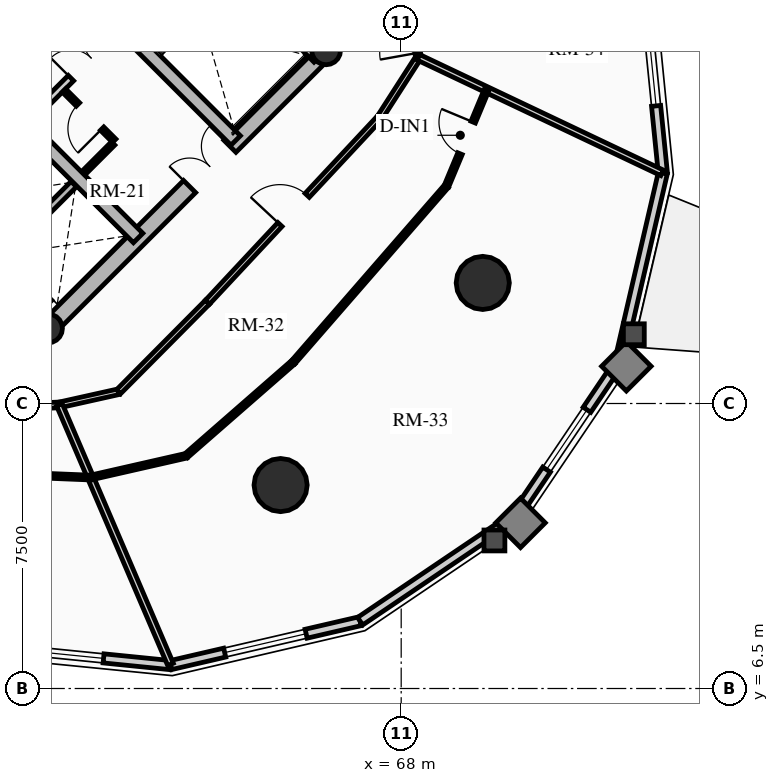
"""IFC4 building model, lengths in metres.
Left out: names, types, materials, properties, quantities, classifications, styles, units other than length and angle.
Written with IfcOpenShell. Run it as: python <this file> out.ifc"""

import sys

from ifc_helpers import new_model, si_unit, direction, frame, frame_2d, origin, origin_2d, place, context, subcontext, project, spatial, rectangle, circle, hollow_circle, extrude, source, transform, mapped, element, fill, save


model = new_model("IFC4")
c1 = context("Model", 3, precision=1e-05, world=origin(), true_north=direction((0.0, 1.0)))
c2 = subcontext(c1, "Body", "Model", "MODEL_VIEW")
j1 = project(units=[si_unit("LENGTHUNIT", "METRE"), si_unit("PLANEANGLEUNIT", "RADIAN")], contexts=[c1])
p1 = place(None, origin())
s1 = spatial("IfcSite", under=j1, at=p1, CompositionType="ELEMENT")
p2 = place(p1, origin())
s2 = spatial("IfcBuilding", under=s1, at=p2, CompositionType="ELEMENT")
p3 = place(p2, frame((0.0, 0.0, 110.89)))
s3 = spatial("IfcBuildingStorey", under=s2, at=p3, CompositionType="ELEMENT", Elevation=110.89)
for number, where, z_axis, x_axis in (
    (1, (58.737, 15.697, 0.0), (0.0, 0.0, 1.0), (-0.707, 0.707, 0.0)),
    (2, (66.303, 23.263, 0.0), (0.0, 0.0, 1.0), (-0.707, 0.707, 0.0)),
):
    element("IfcWall", number, at=place(p3, frame(where, z_axis=z_axis, x_axis=x_axis)), inside=s3, PredefinedType="SHEAR", context=c2, shape_type="SweptSolid", body=[
        extrude(rectangle(XDim=14.2, YDim=0.45, at=frame_2d((7.1, 0.0))), origin(), (0.0, 0.0, 1.0), 2.91),
    ])
p4 = place(p3, frame((58.578, 15.856, 0.0), z_axis=(0.0, 0.0, 1.0), x_axis=(0.707106781187, 0.707106781187, 0.0)))
e3 = element("IfcWall", 3, at=p4, inside=s3, PredefinedType="SHEAR", context=c2, shape_type="SweptSolid", body=[
    extrude(rectangle(XDim=10.7, YDim=0.45, at=frame_2d((5.35, 0.0))), origin(), (0.0, 0.0, 1.0), 2.91),
])
m1 = source(origin(), c2, "Body", "SweptSolid", [
    extrude(rectangle(XDim=1.5, YDim=2.02, at=frame_2d((0.75, 1.01))), frame((0.0, 0.235, 0.0), z_axis=(0.0, -1.0, 0.0), x_axis=(1.0, 0.0, 0.0)), (0.0, 0.0, 1.0), 0.47),
])
p5 = place(p4, frame((5.45, 0.0, 0.0)))
e4 = element("IfcOpeningElement", 4, at=p5, cuts=e3, PredefinedType="OPENING", context=c2, shape_type="MappedRepresentation", body=[
    mapped(m1, transform((0.0, 0.0, 0.0), x_axis=(1.0, 0.0, 0.0), y_axis=(0.0, 1.0, 0.0), z_axis=(0.0, 0.0, 1.0), scale=1.0)),
])
p6 = place(p3, frame((61.078, 18.355, 0.0), z_axis=(0.0, 0.0, 1.0), x_axis=(-0.707106781187, 0.707106781187, 0.0)))
e5 = element("IfcWall", 5, at=p6, inside=s3, PredefinedType="SHEAR", context=c2, shape_type="SweptSolid", body=[
    extrude(rectangle(XDim=13.75, YDim=0.35, at=frame_2d((6.875, 0.0))), origin(), (0.0, 0.0, 1.0), 2.91),
])
m2 = source(origin(), c2, "Body", "SweptSolid", [
    extrude(rectangle(XDim=1.1, YDim=2.015, at=frame_2d((0.55, 1.007))), frame((0.0, 0.185, 0.0), z_axis=(0.0, -1.0, 0.0), x_axis=(1.0, 0.0, 0.0)), (0.0, 0.0, 1.0), 0.37),
])
p7 = place(p6, frame((4.875, 0.0, 0.0)))
e6 = element("IfcOpeningElement", 6, at=p7, cuts=e5, PredefinedType="OPENING", context=c2, shape_type="MappedRepresentation", body=[
    mapped(m2, transform((0.0, 0.0, 0.0), x_axis=(1.0, 0.0, 0.0), y_axis=(0.0, 1.0, 0.0), z_axis=(0.0, 0.0, 1.0), scale=1.0)),
])
m3 = source(origin(), c2, "Body", "SweptSolid", [
    extrude(rectangle(XDim=1.15, YDim=2.02, at=frame_2d((0.575, 1.01))), frame((0.0, 0.185, 0.0), z_axis=(0.0, -1.0, 0.0), x_axis=(1.0, 0.0, 0.0)), (0.0, 0.0, 1.0), 0.37),
])
p8 = place(p6, frame((7.295, 0.0, 0.0)))
e7 = element("IfcOpeningElement", 7, at=p8, cuts=e5, PredefinedType="OPENING", context=c2, shape_type="MappedRepresentation", body=[
    mapped(m3, transform((0.0, 0.0, 0.0), x_axis=(1.0, 0.0, 0.0), y_axis=(0.0, 1.0, 0.0), z_axis=(0.0, 0.0, 1.0), scale=1.0)),
])
p9 = place(p3, frame((63.645, 20.922, 0.0), z_axis=(0.0, 0.0, 1.0), x_axis=(-0.707106781187, 0.707106781187, 0.0)))
e8 = element("IfcWall", 8, at=p9, inside=s3, PredefinedType="SHEAR", context=c2, shape_type="SweptSolid", body=[
    extrude(rectangle(XDim=13.75, YDim=0.35, at=frame_2d((6.875, 0.0))), origin(), (0.0, 0.0, 1.0), 2.91),
])
p10 = place(p9, frame((10.0, 0.0, 0.0)))
e9 = element("IfcOpeningElement", 9, at=p10, cuts=e8, PredefinedType="OPENING", context=c2, shape_type="MappedRepresentation", body=[
    mapped(m2, transform((0.0, 0.0, 0.0), x_axis=(1.0, 0.0, 0.0), y_axis=(0.0, 1.0, 0.0), z_axis=(0.0, 0.0, 1.0), scale=1.0)),
])
p11 = place(p9, frame((12.0, 0.0, 0.0)))
e10 = element("IfcOpeningElement", 10, at=p11, cuts=e8, PredefinedType="OPENING", context=c2, shape_type="MappedRepresentation", body=[
    mapped(m2, transform((0.0, 0.0, 0.0), x_axis=(1.0, 0.0, 0.0), y_axis=(0.0, 1.0, 0.0), z_axis=(0.0, 0.0, 1.0), scale=1.0)),
])
p12 = place(p9, frame((5.305, 0.0, 0.0)))
e11 = element("IfcOpeningElement", 11, at=p12, cuts=e8, PredefinedType="OPENING", context=c2, shape_type="MappedRepresentation", body=[
    mapped(m3, transform((0.0, 0.0, 0.0), x_axis=(1.0, 0.0, 0.0), y_axis=(0.0, 1.0, 0.0), z_axis=(0.0, 0.0, 1.0), scale=1.0)),
])
p13 = place(p3, frame((65.83, 23.107, 0.0), z_axis=(0.0, 0.0, 1.0), x_axis=(-0.707088616009, 0.707124945897, 0.0)))
e12 = element("IfcWall", 12, at=p13, inside=s3, PredefinedType="SHEAR", context=c2, shape_type="SweptSolid", body=[
    extrude(rectangle(XDim=6.72, YDim=0.35, at=frame_2d((3.36, 0.0))), origin(), (0.0, 0.0, 1.0), 2.91),
])
for number, where, z_axis, x_axis in (
    (13, (58.706, 15.976, 0.0), (0.0, 0.0, 1.0), (0.707, 0.707, 0.0)),
    (14, (66.024, 23.294, 0.0), (0.0, 0.0, 1.0), (0.707, 0.707, 0.0)),
):
    element("IfcColumn", number, at=place(p3, frame(where, z_axis=z_axis, x_axis=x_axis)), inside=s3, PredefinedType="COLUMN", context=c2, shape_type="SweptSolid", body=[
        extrude(hollow_circle(Radius=0.38, WallThickness=0.032, at=origin_2d()), origin(), (0.0, 0.0, 1.0), 2.91),
    ])
for number, where, z_axis, x_axis in (
    (15, (64.827, 11.854, 0.0), (0.0, 0.0, 1.0), (1.0, 0.0, 0.0)),
    (16, (70.146, 17.173, 0.0), (0.0, 0.0, 1.0), (1.0, 0.0, 0.0)),
):
    element("IfcColumn", number, at=place(p3, frame(where, z_axis=z_axis, x_axis=x_axis)), inside=s3, PredefinedType="USERDEFINED", context=c2, shape_type="SweptSolid", body=[
        extrude(circle(Radius=0.7, at=origin_2d()), origin(), (0.0, 0.0, 1.0), 2.91),
    ])
p14 = place(p3, frame((61.933, 7.115, 0.0), z_axis=(0.0, 0.0, 1.0), x_axis=(-0.994971754311, 0.10015591906, 0.0)))
e17 = element("IfcWall", 17, at=p14, inside=s3, PredefinedType="SOLIDWALL", context=c2, shape_type="SweptSolid", body=[
    extrude(rectangle(XDim=5.448, YDim=0.24, at=frame_2d((2.724, 0.0))), origin(), (0.0, 0.0, 1.0), 2.179),
])
m4 = source(origin(), c2, "Body", "SweptSolid", [
    extrude(rectangle(XDim=1.9, YDim=1.35, at=frame_2d((0.95, 0.675))), frame((0.0, 0.13, 0.0), z_axis=(0.0, -1.0, 0.0), x_axis=(1.0, 0.0, 0.0)), (0.0, 0.0, 1.0), 0.26),
])
p15 = place(p14, frame((1.774, 0.0, 0.65)))
e18 = element("IfcOpeningElement", 18, at=p15, cuts=e17, PredefinedType="OPENING", context=c2, shape_type="MappedRepresentation", body=[
    mapped(m4, transform((0.0, 0.0, 0.0), x_axis=(1.0, 0.0, 0.0), y_axis=(0.0, 1.0, 0.0), z_axis=(0.0, 0.0, 1.0), scale=1.0)),
])
p16 = place(p3, frame((66.92, 8.271, 0.0), z_axis=(0.0, 0.0, 1.0), x_axis=(-0.974165631126, -0.225834725257, 0.0)))
e19 = element("IfcWall", 19, at=p16, inside=s3, PredefinedType="SOLIDWALL", context=c2, shape_type="SweptSolid", body=[
    extrude(rectangle(XDim=5.119, YDim=0.24, at=frame_2d((2.56, 0.0))), origin(), (0.0, 0.0, 1.0), 2.179),
])
m5 = source(origin(), c2, "Body", "SweptSolid", [
    extrude(rectangle(XDim=2.2, YDim=1.35, at=frame_2d((1.1, 0.675))), frame((0.0, 0.13, 0.0), z_axis=(0.0, -1.0, 0.0), x_axis=(1.0, 0.0, 0.0)), (0.0, 0.0, 1.0), 0.26),
])
p17 = place(p16, frame((1.459, 0.0, 0.65)))
e20 = element("IfcOpeningElement", 20, at=p17, cuts=e19, PredefinedType="OPENING", context=c2, shape_type="MappedRepresentation", body=[
    mapped(m5, transform((0.0, 0.0, 0.0), x_axis=(1.0, 0.0, 0.0), y_axis=(0.0, 1.0, 0.0), z_axis=(0.0, 0.0, 1.0), scale=1.0)),
])
p18 = place(p3, frame((70.985, 11.015, 0.0), z_axis=(0.0, 0.0, 1.0), x_axis=(-0.828781148131, -0.559572880421, 0.0)))
e21 = element("IfcWall", 21, at=p18, inside=s3, PredefinedType="SOLIDWALL", context=c2, shape_type="SweptSolid", body=[
    extrude(rectangle(XDim=4.905, YDim=0.24, at=frame_2d((2.452, 0.0))), origin(), (0.0, 0.0, 1.0), 2.179),
])
p19 = place(p3, frame((73.729, 15.08, 0.0), z_axis=(0.0, 0.0, 1.0), x_axis=(-0.559572880421, -0.828781148131, 0.0)))
e22 = element("IfcWall", 22, at=p19, inside=s3, PredefinedType="SOLIDWALL", context=c2, shape_type="SweptSolid", body=[
    extrude(rectangle(XDim=4.905, YDim=0.24, at=frame_2d((2.452, 0.0))), origin(), (0.0, 0.0, 1.0), 2.179),
])
p20 = place(p19, frame((1.502, 0.0, 0.65)))
e23 = element("IfcOpeningElement", 23, at=p20, cuts=e22, PredefinedType="OPENING", context=c2, shape_type="MappedRepresentation", body=[
    mapped(m4, transform((0.0, 0.0, 0.0), x_axis=(1.0, 0.0, 0.0), y_axis=(0.0, 1.0, 0.0), z_axis=(0.0, 0.0, 1.0), scale=1.0)),
])
p21 = place(p3, frame((74.885, 20.067, 0.0), z_axis=(0.0, 0.0, 1.0), x_axis=(-0.225834725257, -0.974165631126, 0.0)))
e24 = element("IfcWall", 24, at=p21, inside=s3, PredefinedType="SOLIDWALL", context=c2, shape_type="SweptSolid", body=[
    extrude(rectangle(XDim=5.119, YDim=0.24, at=frame_2d((2.56, 0.0))), origin(), (0.0, 0.0, 1.0), 2.179),
])
p22 = place(p3, frame((74.339, 25.487, 0.0), z_axis=(0.0, 0.0, 1.0), x_axis=(0.10015591906, -0.994971754311, 0.0)))
e25 = element("IfcWall", 25, at=p22, inside=s3, PredefinedType="SOLIDWALL", context=c2, shape_type="SweptSolid", body=[
    extrude(rectangle(XDim=5.448, YDim=0.24, at=frame_2d((2.724, 0.0))), origin(), (0.0, 0.0, 1.0), 2.179),
])
p23 = place(p22, frame((1.774, 0.0, 0.65)))
e26 = element("IfcOpeningElement", 26, at=p23, cuts=e25, PredefinedType="OPENING", context=c2, shape_type="MappedRepresentation", body=[
    mapped(m4, transform((0.0, 0.0, 0.0), x_axis=(1.0, 0.0, 0.0), y_axis=(0.0, 1.0, 0.0), z_axis=(0.0, 0.0, 1.0), scale=1.0)),
])
p24 = place(p3, frame((57.284, 17.673, 0.0), z_axis=(0.0, 0.0, 1.0), x_axis=(0.707147878904, 0.70706568108, 0.0)))
e27 = element("IfcWall", 27, at=p24, inside=s3, PredefinedType="SHEAR", context=c2, shape_type="SweptSolid", body=[
    extrude(rectangle(XDim=2.97, YDim=0.2, at=frame_2d((1.485, 0.0))), origin(), (0.0, 0.0, 1.0), 2.91),
])
p25 = place(p3, frame((58.214, 21.467, 0.0), z_axis=(0.0, 0.0, 1.0), x_axis=(0.707106781187, 0.707106781187, 0.0)))
e28 = element("IfcWall", 28, at=p25, inside=s3, PredefinedType="PARTITIONING", context=c2, shape_type="SweptSolid", body=[
    extrude(rectangle(XDim=3.28, YDim=0.2, at=frame_2d((1.64, 0.0))), origin(), (0.0, 0.0, 1.0), 2.655),
])
m6 = source(origin(), c2, "Body", "SweptSolid", [
    extrude(rectangle(XDim=1.5, YDim=2.02, at=frame_2d((0.75, 1.01))), frame((0.0, 0.11, 0.0), z_axis=(0.0, -1.0, 0.0), x_axis=(1.0, 0.0, 0.0)), (0.0, 0.0, 1.0), 0.22),
])
p26 = place(p25, frame((1.55, 0.0, 0.0)))
e29 = element("IfcOpeningElement", 29, at=p26, cuts=e28, PredefinedType="OPENING", context=c2, shape_type="MappedRepresentation", body=[
    mapped(m6, transform((0.0, 0.0, 0.0), x_axis=(1.0, 0.0, 0.0), y_axis=(0.0, 1.0, 0.0), z_axis=(0.0, 0.0, 1.0), scale=1.0)),
])
p27 = place(p3, frame((60.448, 20.915, 0.0), z_axis=(0.0, 0.0, 1.0), x_axis=(-0.707106781187, 0.707106781187, 0.0)))
e30 = element("IfcWall", 30, at=p27, inside=s3, PredefinedType="PARTITIONING", context=c2, shape_type="SweptSolid", body=[
    extrude(rectangle(XDim=1.87, YDim=0.125, at=frame_2d((0.935, 0.0))), origin(), (0.0, 0.0, 1.0), 2.655),
])
m7 = source(origin(), c2, "Body", "SweptSolid", [
    extrude(rectangle(XDim=0.9, YDim=2.005, at=frame_2d((0.45, 1.002))), frame((0.0, 0.073, 0.0), z_axis=(0.0, -1.0, 0.0), x_axis=(1.0, 0.0, 0.0)), (0.0, 0.0, 1.0), 0.145),
])
p28 = place(p27, frame((0.45, 0.0, 0.0)))
e31 = element("IfcOpeningElement", 31, at=p28, cuts=e30, PredefinedType="OPENING", context=c2, shape_type="MappedRepresentation", body=[
    mapped(m7, transform((0.0, 0.0, 0.0), x_axis=(1.0, 0.0, 0.0), y_axis=(0.0, 1.0, 0.0), z_axis=(0.0, 0.0, 1.0), scale=1.0)),
])
p29 = place(p3, frame((59.643, 20.066, 0.0), z_axis=(0.0, 0.0, 1.0), x_axis=(0.707106781187, 0.707106781187, 0.0)))
e32 = element("IfcWall", 32, at=p29, inside=s3, PredefinedType="PARTITIONING", context=c2, shape_type="SweptSolid", body=[
    extrude(rectangle(XDim=1.1, YDim=0.125, at=frame_2d((0.55, 0.0))), origin(), (0.0, 0.0, 1.0), 2.655),
])
p30 = place(p3, frame((57.511, 13.897, 0.0), z_axis=(0.0, 0.0, 1.0), x_axis=(0.999024538494, 0.044158481476, 0.0)))
e33 = element("IfcWall", 33, at=p30, inside=s3, PredefinedType="PARTITIONING", context=c2, shape_type="SweptSolid", body=[
    extrude(rectangle(XDim=1.498, YDim=0.15, at=frame_2d((0.749, 0.0))), origin(), (0.0, 0.0, 1.0), 2.225),
])
p31 = place(p3, frame((59.008, 13.963, 0.0), z_axis=(0.0, 0.0, 1.0), x_axis=(0.976020856791, 0.21767702476, 0.0)))
e34 = element("IfcWall", 34, at=p31, inside=s3, PredefinedType="PARTITIONING", context=c2, shape_type="SweptSolid", body=[
    extrude(rectangle(XDim=1.593, YDim=0.15, at=frame_2d((0.796, 0.0))), origin(), (0.0, 0.0, 1.0), 2.225),
])
p32 = place(p3, frame((60.562, 14.31, 0.0), z_axis=(0.0, 0.0, 1.0), x_axis=(0.704566236161, 0.709638230975, 0.0)))
e35 = element("IfcWall", 35, at=p32, inside=s3, PredefinedType="PARTITIONING", context=c2, shape_type="SweptSolid", body=[
    extrude(rectangle(XDim=3.321, YDim=0.15, at=frame_2d((1.661, 0.0))), origin(), (0.0, 0.0, 1.0), 2.225),
])
p33 = place(p3, frame((62.903, 16.667, 0.0), z_axis=(0.0, 0.0, 1.0), x_axis=(0.682371947497, 0.731005147225, 0.0)))
e36 = element("IfcWall", 36, at=p33, inside=s3, PredefinedType="PARTITIONING", context=c2, shape_type="SweptSolid", body=[
    extrude(rectangle(XDim=6.642, YDim=0.15, at=frame_2d((3.321, 0.0))), origin(), (0.0, 0.0, 1.0), 2.225),
])
m8 = source(origin(), c2, "Body", "SweptSolid", [
    extrude(rectangle(XDim=1.05, YDim=2.015, at=frame_2d((0.525, 1.007))), frame((0.0, 0.085, 0.0), z_axis=(0.0, -1.0, 0.0), x_axis=(1.0, 0.0, 0.0)), (0.0, 0.0, 1.0), 0.17),
])
p34 = place(p33, frame((2.796, 0.0, 0.0)))
e37 = element("IfcOpeningElement", 37, at=p34, cuts=e36, PredefinedType="OPENING", context=c2, shape_type="MappedRepresentation", body=[
    mapped(m8, transform((0.0, 0.0, 0.0), x_axis=(1.0, 0.0, 0.0), y_axis=(0.0, 1.0, 0.0), z_axis=(0.0, 0.0, 1.0), scale=1.0)),
])
p35 = place(p3, frame((67.435, 21.521, 0.0), z_axis=(0.0, 0.0, 1.0), x_axis=(0.540777197838, 0.841165870859, 0.0)))
e38 = element("IfcWall", 38, at=p35, inside=s3, PredefinedType="PARTITIONING", context=c2, shape_type="SweptSolid", body=[
    extrude(rectangle(XDim=1.888, YDim=0.15, at=frame_2d((0.944, 0.0))), origin(), (0.0, 0.0, 1.0), 2.225),
])
p36 = place(p3, frame((68.456, 23.11, 0.0), z_axis=(0.0, 0.0, 1.0), x_axis=(-0.1772522795, 0.984165448191, 0.0)))
e39 = element("IfcWall", 39, at=p36, inside=s3, PredefinedType="PARTITIONING", context=c2, shape_type="SweptSolid", body=[
    extrude(rectangle(XDim=1.382, YDim=0.15, at=frame_2d((0.691, 0.0))), origin(), (0.0, 0.0, 1.0), 2.225),
])
m9 = source(origin(), c2, "Body", "SweptSolid", [
    extrude(rectangle(XDim=1.0, YDim=2.015, at=frame_2d((0.5, 1.007))), frame((0.0, 0.085, 0.0), z_axis=(0.0, -1.0, 0.0), x_axis=(1.0, 0.0, 0.0)), (0.0, 0.0, 1.0), 0.17),
])
p37 = place(p36, frame((0.12, 0.0, 0.0)))
e40 = element("IfcOpeningElement", 40, at=p37, cuts=e39, PredefinedType="OPENING", context=c2, shape_type="MappedRepresentation", body=[
    mapped(m9, transform((0.0, 0.0, 0.0), x_axis=(1.0, 0.0, 0.0), y_axis=(0.0, 1.0, 0.0), z_axis=(0.0, 0.0, 1.0), scale=1.0)),
])
p38 = place(p3, frame((59.008, 13.963, 0.0), z_axis=(0.0, 0.0, 1.0), x_axis=(0.393439207333, -0.919350635032, 0.0)))
e41 = element("IfcWall", 41, at=p38, inside=s3, PredefinedType="PARTITIONING", context=c2, shape_type="SweptSolid", body=[
    extrude(rectangle(XDim=7.427, YDim=0.16, at=frame_2d((3.713, 0.0))), origin(), (0.0, 0.0, 1.0), 2.179),
])
p39 = place(p3, frame((68.456, 23.11, 0.0), z_axis=(0.0, 0.0, 1.0), x_axis=(0.903539425667, -0.428504966442, 0.0)))
e42 = element("IfcWall", 42, at=p39, inside=s3, PredefinedType="PARTITIONING", context=c2, shape_type="SweptSolid", body=[
    extrude(rectangle(XDim=7.094, YDim=0.16, at=frame_2d((3.547, 0.0))), origin(), (0.0, 0.0, 1.0), 2.179),
])
p40 = place(p3, frame((57.233, 12.156, 0.0), z_axis=(0.0, 0.0, 1.0), x_axis=(0.999181916557, -0.040441286156, 0.0)))
e43 = element("IfcWall", 43, at=p40, inside=s3, PredefinedType="PARTITIONING", context=c2, shape_type="SweptSolid", body=[
    extrude(rectangle(XDim=2.596, YDim=0.125, at=frame_2d((1.298, 0.0))), origin(), (0.0, 0.0, 1.0), 2.655),
])
p41 = place(p3, frame((59.826, 12.051, 0.0), z_axis=(0.0, 0.0, 1.0), x_axis=(0.975009915085, 0.222161350116, 0.0)))
e44 = element("IfcWall", 44, at=p41, inside=s3, PredefinedType="PARTITIONING", context=c2, shape_type="SweptSolid", body=[
    extrude(rectangle(XDim=2.578, YDim=0.125, at=frame_2d((1.289, 0.0))), origin(), (0.0, 0.0, 1.0), 2.225),
])
p42 = place(p3, frame((62.34, 12.624, 0.0), z_axis=(0.0, 0.0, 1.0), x_axis=(0.753169839919, 0.657826110941, 0.0)))
e45 = element("IfcWall", 45, at=p42, inside=s3, PredefinedType="PARTITIONING", context=c2, shape_type="SweptSolid", body=[
    extrude(rectangle(XDim=3.746, YDim=0.125, at=frame_2d((1.873, 0.0))), origin(), (0.0, 0.0, 1.0), 2.225),
])
p43 = place(p3, frame((65.162, 15.088, 0.0), z_axis=(0.0, 0.0, 1.0), x_axis=(0.656379509785, 0.754430871011, 0.0)))
e46 = element("IfcWall", 46, at=p43, inside=s3, PredefinedType="PARTITIONING", context=c2, shape_type="SweptSolid", body=[
    extrude(rectangle(XDim=6.14, YDim=0.125, at=frame_2d((3.07, 0.0))), origin(), (0.0, 0.0, 1.0), 2.225),
])
p44 = place(p3, frame((69.192, 19.72, 0.0), z_axis=(0.0, 0.0, 1.0), x_axis=(0.384899070029, 0.922958669655, 0.0)))
e47 = element("IfcWall", 47, at=p44, inside=s3, PredefinedType="PARTITIONING", context=c2, shape_type="SweptSolid", body=[
    extrude(rectangle(XDim=2.75, YDim=0.125, at=frame_2d((1.375, 0.0))), origin(), (0.0, 0.0, 1.0), 2.179),
])
p45 = place(p44, frame((0.925, 0.0, 0.0)))
e48 = element("IfcOpeningElement", 48, at=p45, cuts=e47, PredefinedType="OPENING", context=c2, shape_type="MappedRepresentation", body=[
    mapped(m7, transform((0.0, 0.0, 0.0), x_axis=(1.0, 0.0, 0.0), y_axis=(0.0, 1.0, 0.0), z_axis=(0.0, 0.0, 1.0), scale=1.0)),
])
m10 = source(origin(), c2, "Body", "SweptSolid", [
    extrude(rectangle(XDim=1.9, YDim=1.35, at=frame_2d((0.95, 0.675))), frame((0.0, 0.03, 0.0), z_axis=(0.0, -1.0, 0.0), x_axis=(1.0, 0.0, 0.0)), (0.0, 0.0, 1.0), 0.06),
])
p46 = place(p15, origin())
e49 = element("IfcWindow", 49, at=p46, inside=s3, PartitioningType="DOUBLE_PANEL_VERTICAL", PredefinedType="WINDOW", context=c2, shape_type="MappedRepresentation", body=[
    mapped(m10, transform((0.0, 0.0, 0.0), x_axis=(1.0, 0.0, 0.0), y_axis=(0.0, 1.0, 0.0), z_axis=(0.0, 0.0, 1.0), scale=1.0)),
])
fill(e18, e49)
m11 = source(origin(), c2, "Body", "SweptSolid", [
    extrude(rectangle(XDim=2.2, YDim=1.35, at=frame_2d((1.1, 0.675))), frame((0.0, 0.03, 0.0), z_axis=(0.0, -1.0, 0.0), x_axis=(1.0, 0.0, 0.0)), (0.0, 0.0, 1.0), 0.06),
])
p47 = place(p17, origin())
e50 = element("IfcWindow", 50, at=p47, inside=s3, PartitioningType="DOUBLE_PANEL_VERTICAL", PredefinedType="WINDOW", context=c2, shape_type="MappedRepresentation", body=[
    mapped(m11, transform((0.0, 0.0, 0.0), x_axis=(1.0, 0.0, 0.0), y_axis=(0.0, 1.0, 0.0), z_axis=(0.0, 0.0, 1.0), scale=1.0)),
])
fill(e20, e50)
p48 = place(p20, origin())
e51 = element("IfcWindow", 51, at=p48, inside=s3, PartitioningType="DOUBLE_PANEL_VERTICAL", PredefinedType="WINDOW", context=c2, shape_type="MappedRepresentation", body=[
    mapped(m10, transform((0.0, 0.0, 0.0), x_axis=(1.0, 0.0, 0.0), y_axis=(0.0, 1.0, 0.0), z_axis=(0.0, 0.0, 1.0), scale=1.0)),
])
fill(e23, e51)
p49 = place(p23, origin())
e52 = element("IfcWindow", 52, at=p49, inside=s3, PartitioningType="DOUBLE_PANEL_VERTICAL", PredefinedType="WINDOW", context=c2, shape_type="MappedRepresentation", body=[
    mapped(m10, transform((0.0, 0.0, 0.0), x_axis=(1.0, 0.0, 0.0), y_axis=(0.0, 1.0, 0.0), z_axis=(0.0, 0.0, 1.0), scale=1.0)),
])
fill(e26, e52)
m12 = source(origin(), c2, "Body", "SweptSolid", [
    extrude(rectangle(XDim=1.5, YDim=2.02, at=frame_2d((0.75, 1.01))), frame((0.0, 0.025, 0.0), z_axis=(0.0, -1.0, 0.0), x_axis=(1.0, 0.0, 0.0)), (0.0, 0.0, 1.0), 0.05),
])
p50 = place(p5, origin())
e53 = element("IfcDoor", 53, at=p50, inside=s3, OperationType="DOUBLE_DOOR_SINGLE_SWING", PredefinedType="DOOR", context=c2, shape_type="MappedRepresentation", body=[
    mapped(m12, transform((0.0, 0.0, 0.0), x_axis=(1.0, 0.0, 0.0), y_axis=(0.0, 1.0, 0.0), z_axis=(0.0, 0.0, 1.0), scale=1.0)),
])
fill(e4, e53)
p51 = place(p26, origin())
e54 = element("IfcDoor", 54, at=p51, inside=s3, OperationType="DOUBLE_DOOR_SINGLE_SWING", PredefinedType="DOOR", context=c2, shape_type="MappedRepresentation", body=[
    mapped(m12, transform((0.0, 0.0, 0.0), x_axis=(1.0, 0.0, 0.0), y_axis=(0.0, 1.0, 0.0), z_axis=(0.0, 0.0, 1.0), scale=1.0)),
])
fill(e29, e54)
m13 = source(origin(), c2, "Body", "SweptSolid", [
    extrude(rectangle(XDim=0.9, YDim=2.005, at=frame_2d((0.45, 1.002))), frame((0.0, 0.025, 0.0), z_axis=(0.0, -1.0, 0.0), x_axis=(1.0, 0.0, 0.0)), (0.0, 0.0, 1.0), 0.05),
])
p52 = place(p28, origin())
e55 = element("IfcDoor", 55, at=p52, inside=s3, OperationType="SINGLE_SWING_LEFT", PredefinedType="DOOR", context=c2, shape_type="MappedRepresentation", body=[
    mapped(m13, transform((0.0, 0.0, 0.0), x_axis=(1.0, 0.0, 0.0), y_axis=(0.0, 1.0, 0.0), z_axis=(0.0, 0.0, 1.0), scale=1.0)),
])
fill(e31, e55)
m14 = source(origin(), c2, "Body", "SweptSolid", [
    extrude(rectangle(XDim=1.05, YDim=2.015, at=frame_2d((0.525, 1.007))), frame((0.0, 0.025, 0.0), z_axis=(0.0, -1.0, 0.0), x_axis=(1.0, 0.0, 0.0)), (0.0, 0.0, 1.0), 0.05),
])
p53 = place(p34, origin())
e56 = element("IfcDoor", 56, at=p53, inside=s3, OperationType="SINGLE_SWING_LEFT", PredefinedType="DOOR", context=c2, shape_type="MappedRepresentation", body=[
    mapped(m14, transform((0.0, 0.0, 0.0), x_axis=(1.0, 0.0, 0.0), y_axis=(0.0, 1.0, 0.0), z_axis=(0.0, 0.0, 1.0), scale=1.0)),
])
fill(e37, e56)
p54 = place(p45, origin())
e57 = element("IfcDoor", 57, at=p54, inside=s3, OperationType="SINGLE_SWING_RIGHT", PredefinedType="DOOR", context=c2, shape_type="MappedRepresentation", body=[
    mapped(m13, transform((0.0, 0.0, 0.0), x_axis=(1.0, 0.0, 0.0), y_axis=(0.0, 1.0, 0.0), z_axis=(0.0, 0.0, 1.0), scale=1.0)),
])
fill(e48, e57)
m15 = source(origin(), c2, "Body", "SweptSolid", [
    extrude(rectangle(XDim=1.0, YDim=2.015, at=frame_2d((0.5, 1.007))), frame((0.0, 0.025, 0.0), z_axis=(0.0, -1.0, 0.0), x_axis=(1.0, 0.0, 0.0)), (0.0, 0.0, 1.0), 0.05),
])
p55 = place(p37, origin())
e58 = element("IfcDoor", 58, at=p55, inside=s3, OperationType="SINGLE_SWING_LEFT", PredefinedType="DOOR", context=c2, shape_type="MappedRepresentation", body=[
    mapped(m15, transform((0.0, 0.0, 0.0), x_axis=(1.0, 0.0, 0.0), y_axis=(0.0, 1.0, 0.0), z_axis=(0.0, 0.0, 1.0), scale=1.0)),
])
fill(e40, e58)
save(model, sys.argv[1])
